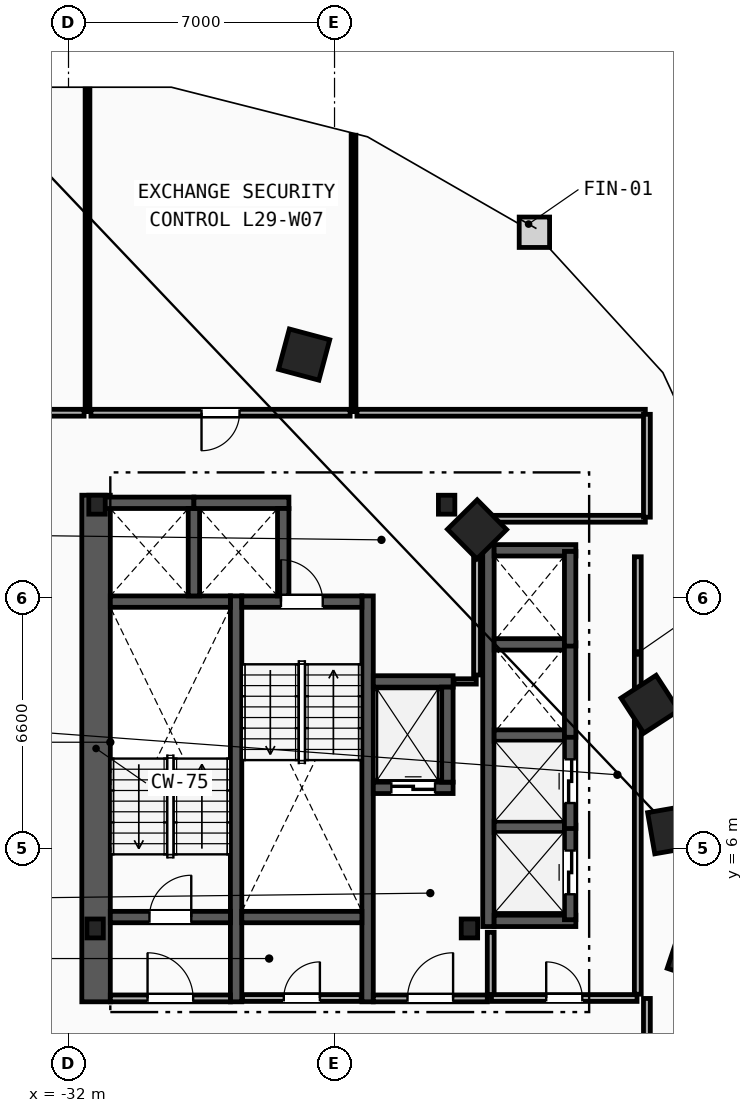
"""IFC4 building model, lengths in metres.
Left out: names, types, materials, properties, quantities, classifications, styles, units other than length and angle.
Written with IfcOpenShell. Run it as: python <this file> out.ifc"""

import sys

from ifc_helpers import new_model, si_unit, direction, frame, frame_2d, origin, origin_2d, place, context, subcontext, project, spatial, rectangle, i_section, extrude, element, fill, save


model = new_model("IFC4")
c1 = context("Model", 3, precision=1e-05, world=origin(), true_north=direction((0.0, 1.0)))
c2 = subcontext(c1, "Body", "Model", "MODEL_VIEW")
j1 = project(units=[si_unit("LENGTHUNIT", "METRE"), si_unit("PLANEANGLEUNIT", "RADIAN")], contexts=[c1])
p1 = place(None, origin())
s1 = spatial("IfcSite", under=j1, at=p1, CompositionType="ELEMENT")
p2 = place(p1, origin())
s2 = spatial("IfcBuilding", under=s1, at=p2, CompositionType="ELEMENT")
p3 = place(p2, frame((0.0, 0.0, 114.2)))
s3 = spatial("IfcBuildingStorey", under=s2, at=p3, CompositionType="ELEMENT", Elevation=114.2)
for number, where, z_axis, x_axis in (
    (1, (-31.3, 3.9, 0.0), (0.0, 0.0, 1.0), (1.0, 0.0, 0.0)),
    (2, (-21.45, 3.9, 0.0), (0.0, 0.0, 1.0), (1.0, 0.0, 0.0)),
    (3, (-22.05, 15.05, 0.0), (0.0, 0.0, 1.0), (1.0, 0.0, 0.0)),
    (4, (-31.25, 15.05, 0.0), (0.0, 0.0, 1.0), (1.0, 0.0, 0.0)),
):
    element("IfcColumn", number, at=place(p3, frame(where, z_axis=z_axis, x_axis=x_axis)), inside=s3, PredefinedType="COLUMN", context=c2, shape_type="SweptSolid", body=[
        extrude(i_section(OverallWidth=0.432, OverallDepth=0.498, WebThickness=0.056, FlangeThickness=0.089, FilletRadius=0.018, at=origin_2d()), origin(), (0.0, 0.0, 1.0), 3.6),
    ])
for number, where, z_axis, x_axis in (
    (5, (-15.55, 3.2, 0.0), (0.0, 0.0, 1.0), (0.315, 0.949, 0.0)),
    (6, (-16.125, 6.5, 0.0), (0.0, 0.0, 1.0), (-0.172, 0.985, 0.0)),
    (7, (-16.7, 9.8, 0.0), (0.0, 0.0, 1.0), (-0.544, 0.839, 0.0)),
    (8, (-21.25, 14.4, 0.0), (0.0, 0.0, 1.0), (-0.703, 0.711, 0.0)),
    (9, (-25.8, 19.0, 0.0), (0.0, 0.0, 1.0), (-0.966, 0.259, 0.0)),
):
    element("IfcColumn", number, at=place(p3, frame(where, z_axis=z_axis, x_axis=x_axis)), inside=s3, PredefinedType="COLUMN", context=c2, shape_type="SweptSolid", body=[
        extrude(rectangle(XDim=1.1, YDim=1.1, at=origin_2d()), origin(), (0.0, 0.0, 1.0), 3.6),
    ])
p4 = place(p3, frame((-31.275, 1.97, 0.0), z_axis=(0.0, 0.0, 1.0), x_axis=(0.0, 1.0, 0.0)))
e10 = element("IfcWall", 10, at=p4, inside=s3, PredefinedType="SHEAR", context=c2, shape_type="SweptSolid", body=[
    extrude(rectangle(XDim=13.33, YDim=0.75, at=frame_2d((6.665, 0.0))), origin(), (0.0, 0.0, 1.0), 3.3),
])
for number, where, z_axis, x_axis in (
    (11, (-27.59, 1.97, 0.0), (0.0, 0.0, 1.0), (0.0, 1.0, 0.0)),
    (12, (-24.13, 1.97, 0.0), (0.0, 0.0, 1.0), (0.0, 1.0, 0.0)),
):
    element("IfcWall", number, at=place(p3, frame(where, z_axis=z_axis, x_axis=x_axis)), inside=s3, PredefinedType="SHEAR", context=c2, shape_type="SweptSolid", body=[
        extrude(rectangle(XDim=10.68, YDim=0.3, at=frame_2d((5.34, 0.0))), origin(), (0.0, 0.0, 1.0), 3.3),
    ])
p5 = place(p3, frame((-30.9, 4.2, 0.0), z_axis=(0.0, 0.0, 1.0), x_axis=(1.0, 0.0, 0.0)))
e13 = element("IfcWall", 13, at=p5, inside=s3, PredefinedType="SHEAR", context=c2, shape_type="SweptSolid", body=[
    extrude(rectangle(XDim=3.16, YDim=0.3, at=frame_2d((1.58, 0.0))), origin(), (0.0, 0.0, 1.0), 3.3),
])
p6 = place(p5, frame((1.03, 0.0, 0.0)))
e14 = element("IfcOpeningElement", 14, at=p6, cuts=e13, PredefinedType="OPENING", context=c2, shape_type="SweptSolid", body=[
    extrude(rectangle(XDim=1.1, YDim=2.15, at=frame_2d((0.55, 1.075))), frame((0.0, 0.16, 0.0), z_axis=(0.0, -1.0, 0.0), x_axis=(1.0, 0.0, 0.0)), (0.0, 0.0, 1.0), 0.32),
])
p7 = place(p3, frame((-30.9, 12.5, 0.0), z_axis=(0.0, 0.0, 1.0), x_axis=(1.0, 0.0, 0.0)))
e15 = element("IfcWall", 15, at=p7, inside=s3, PredefinedType="SHEAR", context=c2, shape_type="SweptSolid", body=[
    extrude(rectangle(XDim=3.16, YDim=0.3, at=frame_2d((1.58, 0.0))), origin(), (0.0, 0.0, 1.0), 3.3),
])
p8 = place(p3, frame((-27.44, 12.5, 0.0), z_axis=(0.0, 0.0, 1.0), x_axis=(1.0, 0.0, 0.0)))
e16 = element("IfcWall", 16, at=p8, inside=s3, PredefinedType="SHEAR", context=c2, shape_type="SweptSolid", body=[
    extrude(rectangle(XDim=3.16, YDim=0.3, at=frame_2d((1.58, 0.0))), origin(), (0.0, 0.0, 1.0), 3.3),
])
p9 = place(p8, frame((1.03, 0.0, 0.0)))
e17 = element("IfcOpeningElement", 17, at=p9, cuts=e16, PredefinedType="OPENING", context=c2, shape_type="SweptSolid", body=[
    extrude(rectangle(XDim=1.1, YDim=2.15, at=frame_2d((0.55, 1.075))), frame((0.0, 0.16, 0.0), z_axis=(0.0, -1.0, 0.0), x_axis=(1.0, 0.0, 0.0)), (0.0, 0.0, 1.0), 0.32),
])
p10 = place(p3, frame((-27.44, 4.2, 0.0), z_axis=(0.0, 0.0, 1.0), x_axis=(1.0, 0.0, 0.0)))
e18 = element("IfcWall", 18, at=p10, inside=s3, PredefinedType="SHEAR", context=c2, shape_type="SweptSolid", body=[
    extrude(rectangle(XDim=3.16, YDim=0.3, at=frame_2d((1.58, 0.0))), origin(), (0.0, 0.0, 1.0), 3.3),
])
p11 = place(p3, frame((-20.89, 2.15, 0.0), z_axis=(0.0, 0.0, 1.0), x_axis=(0.0, 1.0, 0.0)))
e19 = element("IfcWall", 19, at=p11, inside=s3, PredefinedType="PARTITIONING", context=c2, shape_type="SweptSolid", body=[
    extrude(rectangle(XDim=1.65, YDim=0.18, at=frame_2d((0.825, 0.0))), origin(), (0.0, 0.0, 1.0), 3.3),
])
p12 = place(p3, frame((-23.98, 2.06, 0.0), z_axis=(0.0, 0.0, 1.0), x_axis=(1.0, 0.0, 0.0)))
e20 = element("IfcWall", 20, at=p12, inside=s3, PredefinedType="PARTITIONING", context=c2, shape_type="SweptSolid", body=[
    extrude(rectangle(XDim=3.0, YDim=0.18, at=frame_2d((1.5, 0.0))), origin(), (0.0, 0.0, 1.0), 3.3),
])
p13 = place(p12, frame((0.9, 0.0, 0.0)))
e21 = element("IfcOpeningElement", 21, at=p13, cuts=e20, PredefinedType="OPENING", context=c2, shape_type="SweptSolid", body=[
    extrude(rectangle(XDim=1.2, YDim=2.15, at=frame_2d((0.6, 1.075))), frame((0.0, 0.1, 0.0), z_axis=(0.0, -1.0, 0.0), x_axis=(1.0, 0.0, 0.0)), (0.0, 0.0, 1.0), 0.2),
])
p14 = place(p3, frame((-30.9, 2.06, 0.0), z_axis=(0.0, 0.0, 1.0), x_axis=(1.0, 0.0, 0.0)))
e22 = element("IfcWall", 22, at=p14, inside=s3, PredefinedType="PARTITIONING", context=c2, shape_type="SweptSolid", body=[
    extrude(rectangle(XDim=3.16, YDim=0.18, at=frame_2d((1.58, 0.0))), origin(), (0.0, 0.0, 1.0), 3.3),
])
p15 = place(p14, frame((0.98, 0.0, 0.0)))
e23 = element("IfcOpeningElement", 23, at=p15, cuts=e22, PredefinedType="OPENING", context=c2, shape_type="SweptSolid", body=[
    extrude(rectangle(XDim=1.2, YDim=2.15, at=frame_2d((0.6, 1.075))), frame((0.0, 0.1, 0.0), z_axis=(0.0, -1.0, 0.0), x_axis=(1.0, 0.0, 0.0)), (0.0, 0.0, 1.0), 0.2),
])
p16 = place(p3, frame((-23.98, 7.6, 0.0), z_axis=(0.0, 0.0, 1.0), x_axis=(1.0, 0.0, 0.0)))
e24 = element("IfcWall", 24, at=p16, inside=s3, PredefinedType="SHEAR", context=c2, shape_type="SweptSolid", body=[
    extrude(rectangle(XDim=2.1, YDim=0.3, at=frame_2d((1.05, 0.0))), origin(), (0.0, 0.0, 1.0), 3.3),
])
p17 = place(p16, frame((0.475, 0.0, 0.0)))
e25 = element("IfcOpeningElement", 25, at=p17, cuts=e24, PredefinedType="OPENING", context=c2, shape_type="SweptSolid", body=[
    extrude(rectangle(XDim=1.15, YDim=2.2, at=frame_2d((0.575, 1.1))), frame((0.0, 0.16, 0.0), z_axis=(0.0, -1.0, 0.0), x_axis=(1.0, 0.0, 0.0)), (0.0, 0.0, 1.0), 0.32),
])
p18 = place(p3, frame((-23.98, 10.4, 0.0), z_axis=(0.0, 0.0, 1.0), x_axis=(1.0, 0.0, 0.0)))
e26 = element("IfcWall", 26, at=p18, inside=s3, PredefinedType="SHEAR", context=c2, shape_type="SweptSolid", body=[
    extrude(rectangle(XDim=2.1, YDim=0.3, at=frame_2d((1.05, 0.0))), origin(), (0.0, 0.0, 1.0), 3.3),
])
for number, where, z_axis, x_axis in (
    (27, (-22.03, 7.75, 0.0), (0.0, 0.0, 1.0), (0.0, 1.0, 0.0)),
    (28, (-31.2, 15.1, 0.0), (0.0, 0.0, 1.0), (1.0, 0.0, 0.0)),
):
    element("IfcWall", number, at=place(p3, frame(where, z_axis=z_axis, x_axis=x_axis)), inside=s3, PredefinedType="SHEAR", context=c2, shape_type="SweptSolid", body=[
        extrude(rectangle(XDim=2.5, YDim=0.3, at=frame_2d((1.25, 0.0))), origin(), (0.0, 0.0, 1.0), 3.3),
    ])
p19 = place(p3, frame((-28.7, 12.65, 0.0), z_axis=(0.0, 0.0, 1.0), x_axis=(0.0, 1.0, 0.0)))
e29 = element("IfcWall", 29, at=p19, inside=s3, PredefinedType="SHEAR", context=c2, shape_type="SweptSolid", body=[
    extrude(rectangle(XDim=2.3, YDim=0.3, at=frame_2d((1.15, 0.0))), origin(), (0.0, 0.0, 1.0), 3.3),
])
p20 = place(p3, frame((-28.7, 15.1, 0.0), z_axis=(0.0, 0.0, 1.0), x_axis=(1.0, 0.0, 0.0)))
e30 = element("IfcWall", 30, at=p20, inside=s3, PredefinedType="SHEAR", context=c2, shape_type="SweptSolid", body=[
    extrude(rectangle(XDim=2.5, YDim=0.3, at=frame_2d((1.25, 0.0))), origin(), (0.0, 0.0, 1.0), 3.3),
])
p21 = place(p3, frame((-26.35, 12.65, 0.0), z_axis=(0.0, 0.0, 1.0), x_axis=(0.0, 1.0, 0.0)))
e31 = element("IfcWall", 31, at=p21, inside=s3, PredefinedType="SHEAR", context=c2, shape_type="SweptSolid", body=[
    extrude(rectangle(XDim=2.3, YDim=0.3, at=frame_2d((1.15, 0.0))), origin(), (0.0, 0.0, 1.0), 3.3),
])
p22 = place(p3, frame((-20.95, 3.95, 0.0), z_axis=(0.0, 0.0, 1.0), x_axis=(0.0, 1.0, 0.0)))
e32 = element("IfcWall", 32, at=p22, inside=s3, PredefinedType="SHEAR", context=c2, shape_type="SweptSolid", body=[
    extrude(rectangle(XDim=10.05, YDim=0.3, at=frame_2d((5.025, 0.0))), origin(), (0.0, 0.0, 1.0), 3.3),
])
for number, where, z_axis, x_axis in (
    (33, (-20.8, 4.1, 0.0), (0.0, 0.0, 1.0), (1.0, 0.0, 0.0)),
    (34, (-20.8, 13.85, 0.0), (0.0, 0.0, 1.0), (1.0, 0.0, 0.0)),
):
    element("IfcWall", number, at=place(p3, frame(where, z_axis=z_axis, x_axis=x_axis)), inside=s3, PredefinedType="SHEAR", context=c2, shape_type="SweptSolid", body=[
        extrude(rectangle(XDim=2.15, YDim=0.3, at=frame_2d((1.075, 0.0))), origin(), (0.0, 0.0, 1.0), 3.3),
    ])
for number, where, z_axis, x_axis in (
    (35, (-20.8, 6.575, 0.0), (0.0, 0.0, 1.0), (1.0, 0.0, 0.0)),
    (36, (-20.8, 8.975, 0.0), (0.0, 0.0, 1.0), (1.0, 0.0, 0.0)),
    (37, (-20.8, 11.375, 0.0), (0.0, 0.0, 1.0), (1.0, 0.0, 0.0)),
):
    element("IfcWall", number, at=place(p3, frame(where, z_axis=z_axis, x_axis=x_axis)), inside=s3, PredefinedType="SHEAR", context=c2, shape_type="SweptSolid", body=[
        extrude(rectangle(XDim=1.85, YDim=0.3, at=frame_2d((0.925, 0.0))), origin(), (0.0, 0.0, 1.0), 3.3),
    ])
p23 = place(p3, frame((-18.8, 4.13, 0.0), z_axis=(0.0, 0.0, 1.0), x_axis=(0.0, 1.0, 0.0)))
e38 = element("IfcWall", 38, at=p23, inside=s3, PredefinedType="SHEAR", context=c2, shape_type="SweptSolid", body=[
    extrude(rectangle(XDim=2.49, YDim=0.3, at=frame_2d((1.245, 0.0))), origin(), (0.0, 0.0, 1.0), 3.3),
])
p24 = place(p23, frame((0.67, 0.0, 0.0)))
e39 = element("IfcOpeningElement", 39, at=p24, cuts=e38, PredefinedType="OPENING", context=c2, shape_type="SweptSolid", body=[
    extrude(rectangle(XDim=1.15, YDim=2.2, at=frame_2d((0.575, 1.1))), frame((0.0, 0.16, 0.0), z_axis=(0.0, -1.0, 0.0), x_axis=(1.0, 0.0, 0.0)), (0.0, 0.0, 1.0), 0.32),
])
p25 = place(p3, frame((-18.8, 6.53, 0.0), z_axis=(0.0, 0.0, 1.0), x_axis=(0.0, 1.0, 0.0)))
e40 = element("IfcWall", 40, at=p25, inside=s3, PredefinedType="SHEAR", context=c2, shape_type="SweptSolid", body=[
    extrude(rectangle(XDim=2.49, YDim=0.3, at=frame_2d((1.245, 0.0))), origin(), (0.0, 0.0, 1.0), 3.3),
])
p26 = place(p25, frame((0.67, 0.0, 0.0)))
e41 = element("IfcOpeningElement", 41, at=p26, cuts=e40, PredefinedType="OPENING", context=c2, shape_type="SweptSolid", body=[
    extrude(rectangle(XDim=1.15, YDim=2.2, at=frame_2d((0.575, 1.1))), frame((0.0, 0.16, 0.0), z_axis=(0.0, -1.0, 0.0), x_axis=(1.0, 0.0, 0.0)), (0.0, 0.0, 1.0), 0.32),
])
for number, where, z_axis, x_axis in (
    (42, (-18.8, 8.93, 0.0), (0.0, 0.0, 1.0), (0.0, 1.0, 0.0)),
    (43, (-18.8, 11.33, 0.0), (0.0, 0.0, 1.0), (0.0, 1.0, 0.0)),
):
    element("IfcWall", number, at=place(p3, frame(where, z_axis=z_axis, x_axis=x_axis)), inside=s3, PredefinedType="SHEAR", context=c2, shape_type="SweptSolid", body=[
        extrude(rectangle(XDim=2.49, YDim=0.3, at=frame_2d((1.245, 0.0))), origin(), (0.0, 0.0, 1.0), 3.3),
    ])
p27 = place(p3, frame((-17.02, 2.17, 0.0), z_axis=(0.0, 0.0, 1.0), x_axis=(0.0, 1.0, 0.0)))
e44 = element("IfcWall", 44, at=p27, inside=s3, PredefinedType="PARTITIONING", context=c2, shape_type="SweptSolid", body=[
    extrude(rectangle(XDim=11.51, YDim=0.18, at=frame_2d((5.755, 0.0))), origin(), (0.0, 0.0, 1.0), 3.3),
])
p28 = place(p3, frame((-20.87, 2.07, 0.0), z_axis=(0.0, 0.0, 1.0), x_axis=(1.0, 0.0, 0.0)))
e45 = element("IfcWall", 45, at=p28, inside=s3, PredefinedType="PARTITIONING", context=c2, shape_type="SweptSolid", body=[
    extrude(rectangle(XDim=3.83, YDim=0.18, at=frame_2d((1.915, 0.0))), origin(), (0.0, 0.0, 1.0), 3.3),
])
p29 = place(p28, frame((1.44, 0.0, 0.0)))
e46 = element("IfcOpeningElement", 46, at=p29, cuts=e45, PredefinedType="OPENING", context=c2, shape_type="SweptSolid", body=[
    extrude(rectangle(XDim=0.95, YDim=2.1, at=frame_2d((0.475, 1.05))), frame((0.0, 0.1, 0.0), z_axis=(0.0, -1.0, 0.0), x_axis=(1.0, 0.0, 0.0)), (0.0, 0.0, 1.0), 0.2),
])
p30 = place(p3, frame((-21.86, 10.4, 0.0), z_axis=(0.0, 0.0, 1.0), x_axis=(1.0, 0.0, 0.0)))
e47 = element("IfcWall", 47, at=p30, inside=s3, PredefinedType="PARTITIONING", context=c2, shape_type="SweptSolid", body=[
    extrude(rectangle(XDim=0.59, YDim=0.14, at=frame_2d((0.295, 0.0))), origin(), (0.0, 0.0, 1.0), 3.3),
])
p31 = place(p3, frame((-21.25, 10.57, 0.0), z_axis=(0.0, 0.0, 1.0), x_axis=(0.0, 1.0, 0.0)))
e48 = element("IfcWall", 48, at=p31, inside=s3, PredefinedType="PARTITIONING", context=c2, shape_type="SweptSolid", body=[
    extrude(rectangle(XDim=4.36, YDim=0.18, at=frame_2d((2.18, 0.0))), origin(), (0.0, 0.0, 1.0), 3.3),
])
p32 = place(p3, frame((-27.42, 2.07, 0.0), z_axis=(0.0, 0.0, 1.0), x_axis=(1.0, 0.0, 0.0)))
e49 = element("IfcWall", 49, at=p32, inside=s3, PredefinedType="PARTITIONING", context=c2, shape_type="SweptSolid", body=[
    extrude(rectangle(XDim=3.12, YDim=0.18, at=frame_2d((1.56, 0.0))), origin(), (0.0, 0.0, 1.0), 3.3),
])
p33 = place(p32, frame((1.085, 0.0, 0.0)))
e50 = element("IfcOpeningElement", 50, at=p33, cuts=e49, PredefinedType="OPENING", context=c2, shape_type="SweptSolid", body=[
    extrude(rectangle(XDim=0.95, YDim=2.1, at=frame_2d((0.475, 1.05))), frame((0.0, 0.1, 0.0), z_axis=(0.0, -1.0, 0.0), x_axis=(1.0, 0.0, 0.0)), (0.0, 0.0, 1.0), 0.2),
])
p34 = place(p3, frame((-31.5, 17.5, 0.0), z_axis=(0.0, 0.0, 1.0), x_axis=(0.0, 1.0, 0.0)))
e51 = element("IfcWall", 51, at=p34, inside=s3, PredefinedType="PARTITIONING", context=c2, shape_type="SweptSolid", body=[
    extrude(rectangle(XDim=8.485, YDim=0.125, at=frame_2d((4.243, 0.0))), origin(), (0.0, 0.0, 1.0), 3.3),
])
p35 = place(p3, frame((-24.5, 17.5, 0.0), z_axis=(0.0, 0.0, 1.0), x_axis=(0.0, 1.0, 0.0)))
e52 = element("IfcWall", 52, at=p35, inside=s3, PredefinedType="PARTITIONING", context=c2, shape_type="SweptSolid", body=[
    extrude(rectangle(XDim=7.272, YDim=0.125, at=frame_2d((3.636, 0.0))), origin(), (0.0, 0.0, 1.0), 3.3),
])
p36 = place(p3, frame((-16.822, 17.47, 0.0), z_axis=(0.0, 0.0, 1.0), x_axis=(-1.0, 0.0, 0.0)))
e53 = element("IfcWall", 53, at=p36, inside=s3, PredefinedType="PARTITIONING", context=c2, shape_type="SweptSolid", body=[
    extrude(rectangle(XDim=7.588, YDim=0.18, at=frame_2d((3.794, 0.0))), origin(), (0.0, 0.0, 1.0), 3.3),
])
p37 = place(p3, frame((-21.178, 14.68, 0.0), z_axis=(0.0, 0.0, 1.0), x_axis=(1.0, 0.0, 0.0)))
e54 = element("IfcWall", 54, at=p37, inside=s3, PredefinedType="PARTITIONING", context=c2, shape_type="SweptSolid", body=[
    extrude(rectangle(XDim=4.357, YDim=0.18, at=frame_2d((2.178, 0.0))), origin(), (0.0, 0.0, 1.0), 3.3),
])
p38 = place(p3, frame((-16.78, 14.721, 0.0), z_axis=(0.0, 0.0, 1.0), x_axis=(0.0, 1.0, 0.0)))
e55 = element("IfcWall", 55, at=p38, inside=s3, PredefinedType="PARTITIONING", context=c2, shape_type="SweptSolid", body=[
    extrude(rectangle(XDim=2.707, YDim=0.18, at=frame_2d((1.354, 0.0))), origin(), (0.0, 0.0, 1.0), 3.3),
])
p39 = place(p3, frame((-16.78, -0.329, 0.0), z_axis=(0.0, 0.0, 1.0), x_axis=(0.0, 1.0, 0.0)))
e56 = element("IfcWall", 56, at=p39, inside=s3, PredefinedType="PARTITIONING", context=c2, shape_type="SweptSolid", body=[
    extrude(rectangle(XDim=2.387, YDim=0.18, at=frame_2d((1.194, 0.0))), origin(), (0.0, 0.0, 1.0), 3.3),
])
p40 = place(p3, frame((-31.59, 17.47, 0.0), z_axis=(0.0, 0.0, 1.0), x_axis=(-1.0, 0.0, 0.0)))
e57 = element("IfcWall", 57, at=p40, inside=s3, PredefinedType="PARTITIONING", context=c2, shape_type="SweptSolid", body=[
    extrude(rectangle(XDim=2.038, YDim=0.18, at=frame_2d((1.019, 0.0))), origin(), (0.0, 0.0, 1.0), 3.3),
])
p41 = place(p3, frame((-24.59, 17.47, 0.0), z_axis=(0.0, 0.0, 1.0), x_axis=(-1.0, 0.0, 0.0)))
e58 = element("IfcWall", 58, at=p41, inside=s3, PredefinedType="PARTITIONING", context=c2, shape_type="SweptSolid", body=[
    extrude(rectangle(XDim=6.82, YDim=0.18, at=frame_2d((3.41, 0.0))), origin(), (0.0, 0.0, 1.0), 3.3),
])
p42 = place(p41, frame((2.91, 0.0, 0.0)))
e59 = element("IfcOpeningElement", 59, at=p42, cuts=e58, PredefinedType="OPENING", context=c2, shape_type="SweptSolid", body=[
    extrude(rectangle(XDim=1.0, YDim=2.15, at=frame_2d((0.5, 1.075))), frame((0.0, 0.1, 0.0), z_axis=(0.0, -1.0, 0.0), x_axis=(1.0, 0.0, 0.0)), (0.0, 0.0, 1.0), 0.2),
])
p43 = place(p6, origin())
e60 = element("IfcDoor", 60, at=p43, inside=s3, OperationType="SINGLE_SWING_RIGHT", PredefinedType="DOOR", context=c2, shape_type="SweptSolid", body=[
    extrude(rectangle(XDim=1.1, YDim=2.15, at=frame_2d((0.55, 1.075))), frame((0.0, 0.025, 0.0), z_axis=(0.0, -1.0, 0.0), x_axis=(1.0, 0.0, 0.0)), (0.0, 0.0, 1.0), 0.05),
])
fill(e14, e60)
p44 = place(p9, origin())
e61 = element("IfcDoor", 61, at=p44, inside=s3, OperationType="SINGLE_SWING_LEFT", PredefinedType="DOOR", context=c2, shape_type="SweptSolid", body=[
    extrude(rectangle(XDim=1.1, YDim=2.15, at=frame_2d((0.55, 1.075))), frame((0.0, 0.025, 0.0), z_axis=(0.0, -1.0, 0.0), x_axis=(1.0, 0.0, 0.0)), (0.0, 0.0, 1.0), 0.05),
])
fill(e17, e61)
p45 = place(p13, origin())
e62 = element("IfcDoor", 62, at=p45, inside=s3, OperationType="SINGLE_SWING_RIGHT", PredefinedType="DOOR", context=c2, shape_type="SweptSolid", body=[
    extrude(rectangle(XDim=1.2, YDim=2.15, at=frame_2d((0.6, 1.075))), frame((0.0, 0.025, 0.0), z_axis=(0.0, -1.0, 0.0), x_axis=(1.0, 0.0, 0.0)), (0.0, 0.0, 1.0), 0.05),
])
fill(e21, e62)
p46 = place(p15, origin())
e63 = element("IfcDoor", 63, at=p46, inside=s3, OperationType="SINGLE_SWING_LEFT", PredefinedType="DOOR", context=c2, shape_type="SweptSolid", body=[
    extrude(rectangle(XDim=1.2, YDim=2.15, at=frame_2d((0.6, 1.075))), frame((0.0, 0.025, 0.0), z_axis=(0.0, -1.0, 0.0), x_axis=(1.0, 0.0, 0.0)), (0.0, 0.0, 1.0), 0.05),
])
fill(e23, e63)
p47 = place(p17, origin())
e64 = element("IfcDoor", 64, at=p47, inside=s3, OperationType="SLIDING_TO_LEFT", PredefinedType="TRAPDOOR", context=c2, shape_type="SweptSolid", body=[
    extrude(rectangle(XDim=1.15, YDim=2.2, at=frame_2d((0.575, 1.1))), frame((0.0, 0.025, 0.0), z_axis=(0.0, -1.0, 0.0), x_axis=(1.0, 0.0, 0.0)), (0.0, 0.0, 1.0), 0.05),
])
fill(e25, e64)
p48 = place(p24, origin())
e65 = element("IfcDoor", 65, at=p48, inside=s3, OperationType="SLIDING_TO_LEFT", PredefinedType="TRAPDOOR", context=c2, shape_type="SweptSolid", body=[
    extrude(rectangle(XDim=1.15, YDim=2.2, at=frame_2d((0.575, 1.1))), frame((0.0, 0.025, 0.0), z_axis=(0.0, -1.0, 0.0), x_axis=(1.0, 0.0, 0.0)), (0.0, 0.0, 1.0), 0.05),
])
fill(e39, e65)
p49 = place(p26, origin())
e66 = element("IfcDoor", 66, at=p49, inside=s3, OperationType="SLIDING_TO_LEFT", PredefinedType="TRAPDOOR", context=c2, shape_type="SweptSolid", body=[
    extrude(rectangle(XDim=1.15, YDim=2.2, at=frame_2d((0.575, 1.1))), frame((0.0, 0.025, 0.0), z_axis=(0.0, -1.0, 0.0), x_axis=(1.0, 0.0, 0.0)), (0.0, 0.0, 1.0), 0.05),
])
fill(e41, e66)
p50 = place(p42, origin())
e67 = element("IfcDoor", 67, at=p50, inside=s3, OperationType="SINGLE_SWING_RIGHT", PredefinedType="DOOR", context=c2, shape_type="SweptSolid", body=[
    extrude(rectangle(XDim=1.0, YDim=2.15, at=frame_2d((0.5, 1.075))), frame((0.0, 0.025, 0.0), z_axis=(0.0, -1.0, 0.0), x_axis=(1.0, 0.0, 0.0)), (0.0, 0.0, 1.0), 0.05),
])
fill(e59, e67)
p51 = place(p29, origin())
e68 = element("IfcDoor", 68, at=p51, inside=s3, OperationType="SINGLE_SWING_LEFT", PredefinedType="DOOR", context=c2, shape_type="SweptSolid", body=[
    extrude(rectangle(XDim=0.95, YDim=2.1, at=frame_2d((0.475, 1.05))), frame((0.0, 0.025, 0.0), z_axis=(0.0, -1.0, 0.0), x_axis=(1.0, 0.0, 0.0)), (0.0, 0.0, 1.0), 0.05),
])
fill(e46, e68)
p52 = place(p33, origin())
e69 = element("IfcDoor", 69, at=p52, inside=s3, OperationType="SINGLE_SWING_RIGHT", PredefinedType="DOOR", context=c2, shape_type="SweptSolid", body=[
    extrude(rectangle(XDim=0.95, YDim=2.1, at=frame_2d((0.475, 1.05))), frame((0.0, 0.025, 0.0), z_axis=(0.0, -1.0, 0.0), x_axis=(1.0, 0.0, 0.0)), (0.0, 0.0, 1.0), 0.05),
])
fill(e50, e69)
save(model, sys.argv[1])
